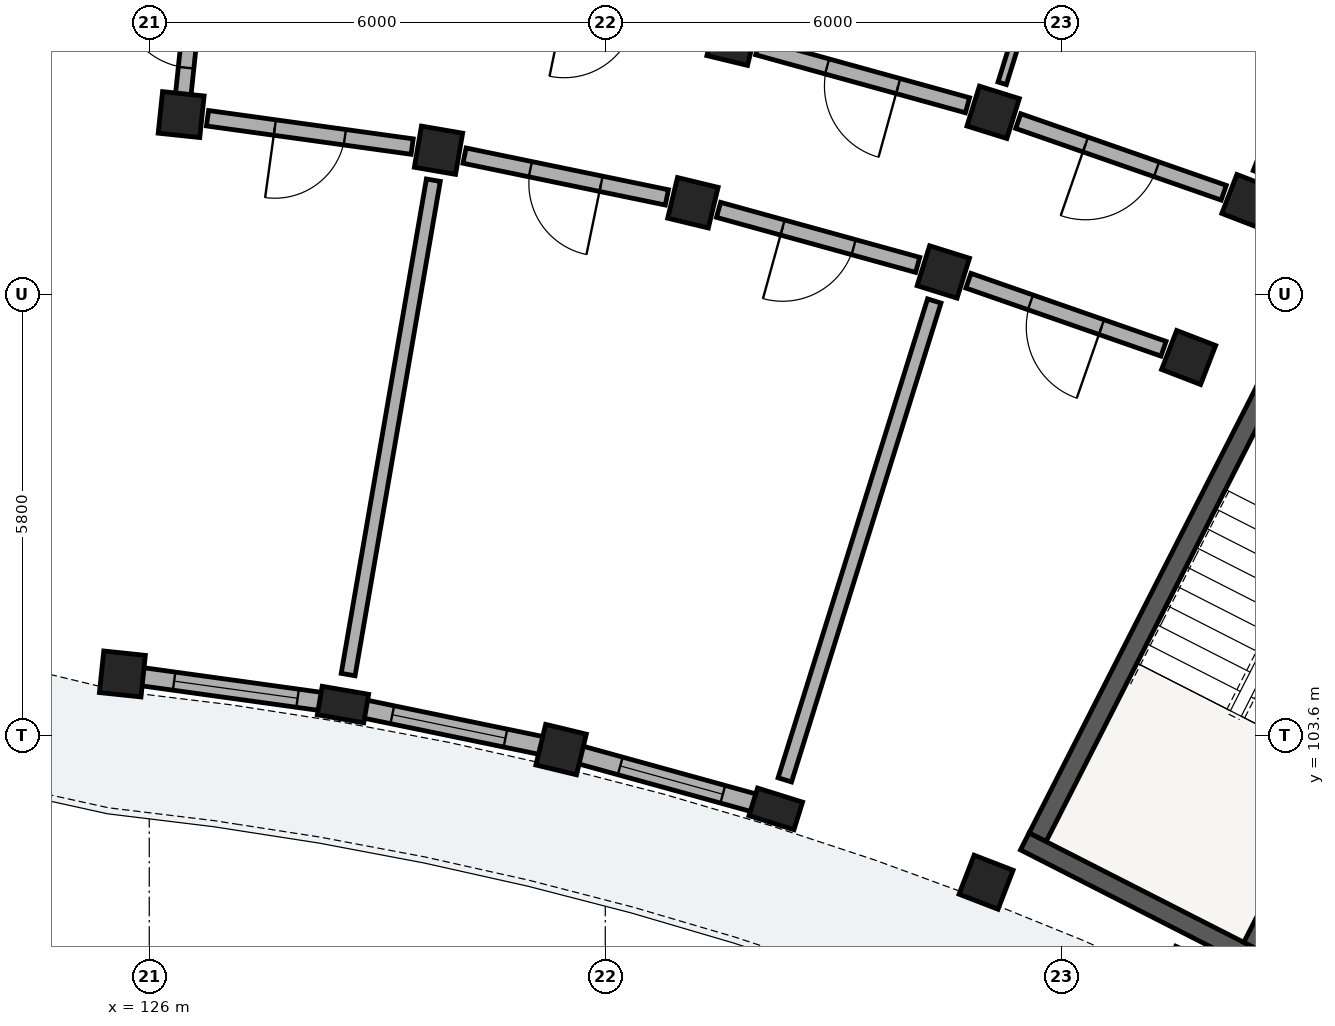
"""IFC4 building model, lengths in metres.
Left out: names, types, materials, properties, quantities, classifications, styles, units other than length and angle.
Written with IfcOpenShell. Run it as: python <this file> out.ifc"""

import sys

from ifc_helpers import new_model, si_unit, direction, frame, frame_2d, origin, origin_2d, place, context, subcontext, project, spatial, rectangle, extrude, element, fill, save


model = new_model("IFC4")
c1 = context("Model", 3, precision=1e-05, world=origin(), true_north=direction((0.0, 1.0)))
c2 = subcontext(c1, "Body", "Model", "MODEL_VIEW")
j1 = project(units=[si_unit("LENGTHUNIT", "METRE"), si_unit("PLANEANGLEUNIT", "RADIAN")], contexts=[c1])
p1 = place(None, origin())
s1 = spatial("IfcSite", under=j1, at=p1, CompositionType="ELEMENT")
p2 = place(p1, origin())
s2 = spatial("IfcBuilding", under=s1, at=p2, CompositionType="ELEMENT")
p3 = place(p2, frame((0.0, 0.0, 18.92)))
s3 = spatial("IfcBuildingStorey", under=s2, at=p3, CompositionType="ELEMENT", Elevation=18.92)
p4 = place(p3, frame((140.684, 108.139, 0.0), z_axis=(0.0, 0.0, 1.0), x_axis=(-0.453992276384, -0.891005618941, 0.0)))
e1 = element("IfcWall", 1, at=p4, inside=s3, PredefinedType="SHEAR", context=c2, shape_type="SweptSolid", body=[
    extrude(rectangle(XDim=6.6, YDim=0.25, at=frame_2d((3.3, 0.0))), origin(), (0.0, 0.0, 1.0), 3.11),
])
p5 = place(p3, frame((137.52, 102.203, 0.0), z_axis=(0.0, 0.0, 1.0), x_axis=(0.891003540237, -0.453996356025, 0.0)))
e2 = element("IfcWall", 2, at=p5, inside=s3, PredefinedType="SHEAR", context=c2, shape_type="SweptSolid", body=[
    extrude(rectangle(XDim=3.42, YDim=0.25, at=frame_2d((1.71, 0.0))), origin(), (0.0, 0.0, 1.0), 3.11),
])
p6 = place(p3, frame((143.509, 106.699, 0.0), z_axis=(0.0, 0.0, 1.0), x_axis=(-0.453992276384, -0.891005618941, 0.0)))
e3 = element("IfcWall", 3, at=p6, inside=s3, PredefinedType="SHEAR", context=c2, shape_type="SweptSolid", body=[
    extrude(rectangle(XDim=6.6, YDim=0.25, at=frame_2d((3.3, 0.0))), origin(), (0.0, 0.0, 1.0), 3.11),
])
p7 = place(p6, frame((0.22, 0.0, 0.0)))
e4 = element("IfcOpeningElement", 4, at=p7, cuts=e3, PredefinedType="OPENING", context=c2, shape_type="SweptSolid", body=[
    extrude(rectangle(XDim=1.05, YDim=2.15, at=frame_2d((0.525, 1.075))), frame((0.0, 0.135, 0.0), z_axis=(0.0, -1.0, 0.0), x_axis=(1.0, 0.0, 0.0)), (0.0, 0.0, 1.0), 0.27),
])
for number, where, z_axis, x_axis in (
    (5, (137.01, 101.667, 0.0), (0.0, 0.0, 1.0), (0.36, 0.933, 0.0)),
    (6, (139.675, 108.57, 0.0), (0.0, 0.0, 1.0), (0.36, 0.933, 0.0)),
    (7, (140.468, 110.622, 0.0), (0.0, 0.0, 1.0), (0.36, 0.933, 0.0)),
):
    element("IfcColumn", number, at=place(p3, frame(where, z_axis=z_axis, x_axis=x_axis)), inside=s3, PredefinedType="COLUMN", context=c2, shape_type="SweptSolid", body=[
        extrude(rectangle(XDim=0.55, YDim=0.55, at=origin_2d()), origin(), (0.0, 0.0, 1.0), 3.11),
    ])
p8 = place(p3, frame((134.243, 102.631, 0.0), z_axis=(0.0, 0.0, 1.0), x_axis=(0.297930225503, 0.954587649581, 0.0)))
e8 = element("IfcColumn", 8, at=p8, inside=s3, PredefinedType="PILASTER", context=c2, shape_type="SweptSolid", body=[
    extrude(rectangle(XDim=0.38, YDim=0.62, at=origin_2d()), origin(), (0.0, 0.0, 1.0), 3.11),
])
for number, where, z_axis, x_axis in (
    (9, (136.448, 109.695, 0.0), (0.0, 0.0, 1.0), (0.298, 0.955, 0.0)),
    (10, (137.103, 111.795, 0.0), (0.0, 0.0, 1.0), (0.298, 0.955, 0.0)),
    (11, (131.418, 103.412, 0.0), (0.0, 0.0, 1.0), (0.234, 0.972, 0.0)),
    (12, (133.153, 110.606, 0.0), (0.0, 0.0, 1.0), (0.234, 0.972, 0.0)),
    (13, (133.669, 112.744, 0.0), (0.0, 0.0, 1.0), (0.234, 0.972, 0.0)),
):
    element("IfcColumn", number, at=place(p3, frame(where, z_axis=z_axis, x_axis=x_axis)), inside=s3, PredefinedType="COLUMN", context=c2, shape_type="SweptSolid", body=[
        extrude(rectangle(XDim=0.55, YDim=0.55, at=origin_2d()), origin(), (0.0, 0.0, 1.0), 3.11),
    ])
p9 = place(p3, frame((128.549, 104.004, 0.0), z_axis=(0.0, 0.0, 1.0), x_axis=(0.169827230012, 0.985473851478, 0.0)))
e14 = element("IfcColumn", 14, at=p9, inside=s3, PredefinedType="PILASTER", context=c2, shape_type="SweptSolid", body=[
    extrude(rectangle(XDim=0.38, YDim=0.62, at=origin_2d()), origin(), (0.0, 0.0, 1.0), 3.11),
])
for number, where, z_axis, x_axis in (
    (15, (129.806, 111.297, 0.0), (0.0, 0.0, 1.0), (0.17, 0.985, 0.0)),
    (16, (125.646, 104.406, 0.0), (0.0, 0.0, 1.0), (0.105, 0.995, 0.0)),
    (17, (126.42, 111.766, 0.0), (0.0, 0.0, 1.0), (0.105, 0.995, 0.0)),
):
    element("IfcColumn", number, at=place(p3, frame(where, z_axis=z_axis, x_axis=x_axis)), inside=s3, PredefinedType="COLUMN", context=c2, shape_type="SweptSolid", body=[
        extrude(rectangle(XDim=0.55, YDim=0.55, at=origin_2d()), origin(), (0.0, 0.0, 1.0), 3.11),
    ])
p10 = place(p3, frame((134.089, 102.674, 0.0), z_axis=(0.0, 0.0, 1.0), x_axis=(-0.963901971286, 0.266257375017, 0.0)))
e18 = element("IfcWall", 18, at=p10, inside=s3, PredefinedType="SOLIDWALL", context=c2, shape_type="SweptSolid", body=[
    extrude(rectangle(XDim=2.525, YDim=0.24, at=frame_2d((1.263, 0.0))), origin(), (0.0, 0.0, 1.0), 2.355),
])
p11 = place(p10, frame((0.562, 0.0, 0.35)))
e19 = element("IfcOpeningElement", 19, at=p11, cuts=e18, PredefinedType="OPENING", context=c2, shape_type="SweptSolid", body=[
    extrude(rectangle(XDim=1.4, YDim=1.635, at=frame_2d((0.7, 0.817))), frame((0.0, 0.13, 0.0), z_axis=(0.0, -1.0, 0.0), x_axis=(1.0, 0.0, 0.0)), (0.0, 0.0, 1.0), 0.26),
])
p12 = place(p3, frame((131.179, 103.461, 0.0), z_axis=(0.0, 0.0, 1.0), x_axis=(-0.979353576928, 0.202154820272, 0.0)))
e20 = element("IfcWall", 20, at=p12, inside=s3, PredefinedType="SOLIDWALL", context=c2, shape_type="SweptSolid", body=[
    extrude(rectangle(XDim=2.525, YDim=0.24, at=frame_2d((1.263, 0.0))), origin(), (0.0, 0.0, 1.0), 2.355),
])
p13 = place(p12, frame((0.503, 0.0, 0.55)))
e21 = element("IfcOpeningElement", 21, at=p13, cuts=e20, PredefinedType="OPENING", context=c2, shape_type="SweptSolid", body=[
    extrude(rectangle(XDim=1.52, YDim=1.485, at=frame_2d((0.76, 0.743))), frame((0.0, 0.13, 0.0), z_axis=(0.0, -1.0, 0.0), x_axis=(1.0, 0.0, 0.0)), (0.0, 0.0, 1.0), 0.26),
])
p14 = place(p3, frame((128.39, 104.026, 0.0), z_axis=(0.0, 0.0, 1.0), x_axis=(-0.990545622952, 0.13718370476, 0.0)))
e22 = element("IfcWall", 22, at=p14, inside=s3, PredefinedType="SOLIDWALL", context=c2, shape_type="SweptSolid", body=[
    extrude(rectangle(XDim=2.525, YDim=0.24, at=frame_2d((1.263, 0.0))), origin(), (0.0, 0.0, 1.0), 2.355),
])
p15 = place(p14, frame((0.443, 0.0, 0.55)))
e23 = element("IfcOpeningElement", 23, at=p15, cuts=e22, PredefinedType="OPENING", context=c2, shape_type="SweptSolid", body=[
    extrude(rectangle(XDim=1.64, YDim=1.56, at=frame_2d((0.82, 0.78))), frame((0.0, 0.13, 0.0), z_axis=(0.0, -1.0, 0.0), x_axis=(1.0, 0.0, 0.0)), (0.0, 0.0, 1.0), 0.26),
])
p16 = place(p3, frame((140.612, 110.996, 0.0), z_axis=(0.0, 0.0, 1.0), x_axis=(0.360186633854, 0.932880264982, 0.0)))
e24 = element("IfcWall", 24, at=p16, inside=s3, PredefinedType="PARTITIONING", context=c2, shape_type="SweptSolid", body=[
    extrude(rectangle(XDim=4.7, YDim=0.185, at=frame_2d((2.35, 0.0))), origin(), (0.0, 0.0, 1.0), 2.37),
])
p17 = place(p3, frame((140.137, 110.738, 0.0), z_axis=(0.0, 0.0, 1.0), x_axis=(-0.944253820929, 0.329218349522, 0.0)))
e25 = element("IfcWall", 25, at=p17, inside=s3, PredefinedType="PARTITIONING", context=c2, shape_type="SweptSolid", body=[
    extrude(rectangle(XDim=2.863, YDim=0.205, at=frame_2d((1.432, 0.0))), origin(), (0.0, 0.0, 1.0), 2.37),
])
p18 = place(p17, frame((0.937, 0.0, 0.0)))
e26 = element("IfcOpeningElement", 26, at=p18, cuts=e25, PredefinedType="OPENING", context=c2, shape_type="SweptSolid", body=[
    extrude(rectangle(XDim=0.99, YDim=2.16, at=frame_2d((0.495, 1.08))), frame((0.0, 0.113, 0.0), z_axis=(0.0, -1.0, 0.0), x_axis=(1.0, 0.0, 0.0)), (0.0, 0.0, 1.0), 0.225),
])
p19 = place(p3, frame((139.345, 108.685, 0.0), z_axis=(0.0, 0.0, 1.0), x_axis=(-0.944265123647, 0.329185929627, 0.0)))
e27 = element("IfcWall", 27, at=p19, inside=s3, PredefinedType="PARTITIONING", context=c2, shape_type="SweptSolid", body=[
    extrude(rectangle(XDim=2.718, YDim=0.205, at=frame_2d((1.359, 0.0))), origin(), (0.0, 0.0, 1.0), 2.37),
])
p20 = place(p19, frame((0.864, 0.0, 0.0)))
e28 = element("IfcOpeningElement", 28, at=p20, cuts=e27, PredefinedType="OPENING", context=c2, shape_type="SweptSolid", body=[
    extrude(rectangle(XDim=0.99, YDim=2.16, at=frame_2d((0.495, 1.08))), frame((0.0, 0.113, 0.0), z_axis=(0.0, -1.0, 0.0), x_axis=(1.0, 0.0, 0.0)), (0.0, 0.0, 1.0), 0.225),
])
p21 = place(p3, frame((137.222, 112.177, 0.0), z_axis=(0.0, 0.0, 1.0), x_axis=(0.297905254614, 0.954595442726, 0.0)))
e29 = element("IfcWall", 29, at=p21, inside=s3, PredefinedType="PARTITIONING", context=c2, shape_type="SweptSolid", body=[
    extrude(rectangle(XDim=4.7, YDim=0.115, at=frame_2d((2.35, 0.0))), origin(), (0.0, 0.0, 1.0), 2.37),
])
p22 = place(p21, frame((1.905, 0.0, 0.0)))
e30 = element("IfcOpeningElement", 30, at=p22, cuts=e29, PredefinedType="OPENING", context=c2, shape_type="SweptSolid", body=[
    extrude(rectangle(XDim=0.89, YDim=2.1, at=frame_2d((0.445, 1.05))), frame((0.0, 0.067, 0.0), z_axis=(0.0, -1.0, 0.0), x_axis=(1.0, 0.0, 0.0)), (0.0, 0.0, 1.0), 0.135),
])
p23 = place(p3, frame((134.362, 103.013, 0.0), z_axis=(0.0, 0.0, 1.0), x_axis=(0.2979590431, 0.954578655028, 0.0)))
e31 = element("IfcWall", 31, at=p23, inside=s3, PredefinedType="PARTITIONING", context=c2, shape_type="SweptSolid", body=[
    extrude(rectangle(XDim=6.6, YDim=0.185, at=frame_2d((3.3, 0.0))), origin(), (0.0, 0.0, 1.0), 2.37),
])
p24 = place(p3, frame((136.766, 111.889, 0.0), z_axis=(0.0, 0.0, 1.0), x_axis=(-0.963890789093, 0.266297853356, 0.0)))
e32 = element("IfcWall", 32, at=p24, inside=s3, PredefinedType="PARTITIONING", context=c2, shape_type="SweptSolid", body=[
    extrude(rectangle(XDim=2.863, YDim=0.205, at=frame_2d((1.432, 0.0))), origin(), (0.0, 0.0, 1.0), 2.37),
])
p25 = place(p24, frame((0.947, 0.0, 0.0)))
e33 = element("IfcOpeningElement", 33, at=p25, cuts=e32, PredefinedType="OPENING", context=c2, shape_type="SweptSolid", body=[
    extrude(rectangle(XDim=0.97, YDim=2.15, at=frame_2d((0.485, 1.075))), frame((0.0, 0.113, 0.0), z_axis=(0.0, -1.0, 0.0), x_axis=(1.0, 0.0, 0.0)), (0.0, 0.0, 1.0), 0.225),
])
p26 = place(p3, frame((136.11, 109.789, 0.0), z_axis=(0.0, 0.0, 1.0), x_axis=(-0.96388375821, 0.266323301006, 0.0)))
e34 = element("IfcWall", 34, at=p26, inside=s3, PredefinedType="PARTITIONING", context=c2, shape_type="SweptSolid", body=[
    extrude(rectangle(XDim=2.718, YDim=0.205, at=frame_2d((1.359, 0.0))), origin(), (0.0, 0.0, 1.0), 2.37),
])
p27 = place(p26, frame((0.874, 0.0, 0.0)))
e35 = element("IfcOpeningElement", 35, at=p27, cuts=e34, PredefinedType="OPENING", context=c2, shape_type="SweptSolid", body=[
    extrude(rectangle(XDim=0.97, YDim=2.15, at=frame_2d((0.485, 1.075))), frame((0.0, 0.113, 0.0), z_axis=(0.0, -1.0, 0.0), x_axis=(1.0, 0.0, 0.0)), (0.0, 0.0, 1.0), 0.225),
])
p28 = place(p3, frame((132.81, 110.677, 0.0), z_axis=(0.0, 0.0, 1.0), x_axis=(-0.979349423541, 0.202174940608, 0.0)))
e36 = element("IfcWall", 36, at=p28, inside=s3, PredefinedType="PARTITIONING", context=c2, shape_type="SweptSolid", body=[
    extrude(rectangle(XDim=2.718, YDim=0.205, at=frame_2d((1.359, 0.0))), origin(), (0.0, 0.0, 1.0), 2.37),
])
p29 = place(p28, frame((0.884, 0.0, 0.0)))
e37 = element("IfcOpeningElement", 37, at=p29, cuts=e36, PredefinedType="OPENING", context=c2, shape_type="SweptSolid", body=[
    extrude(rectangle(XDim=0.95, YDim=2.13, at=frame_2d((0.475, 1.065))), frame((0.0, 0.113, 0.0), z_axis=(0.0, -1.0, 0.0), x_axis=(1.0, 0.0, 0.0)), (0.0, 0.0, 1.0), 0.225),
])
p30 = place(p3, frame((128.617, 104.398, 0.0), z_axis=(0.0, 0.0, 1.0), x_axis=(0.169825160084, 0.985474208187, 0.0)))
e38 = element("IfcWall", 38, at=p30, inside=s3, PredefinedType="PARTITIONING", context=c2, shape_type="SweptSolid", body=[
    extrude(rectangle(XDim=6.6, YDim=0.185, at=frame_2d((3.3, 0.0))), origin(), (0.0, 0.0, 1.0), 2.37),
])
p31 = place(p3, frame((129.459, 111.345, 0.0), z_axis=(0.0, 0.0, 1.0), x_axis=(-0.990535404475, 0.137257467855, 0.0)))
e39 = element("IfcWall", 39, at=p31, inside=s3, PredefinedType="PARTITIONING", context=c2, shape_type="SweptSolid", body=[
    extrude(rectangle(XDim=2.718, YDim=0.205, at=frame_2d((1.359, 0.0))), origin(), (0.0, 0.0, 1.0), 2.37),
])
p32 = place(p31, frame((0.894, 0.0, 0.0)))
e40 = element("IfcOpeningElement", 40, at=p32, cuts=e39, PredefinedType="OPENING", context=c2, shape_type="SweptSolid", body=[
    extrude(rectangle(XDim=0.93, YDim=2.12, at=frame_2d((0.465, 1.06))), frame((0.0, 0.113, 0.0), z_axis=(0.0, -1.0, 0.0), x_axis=(1.0, 0.0, 0.0)), (0.0, 0.0, 1.0), 0.225),
])
p33 = place(p3, frame((126.425, 111.816, 0.0), z_axis=(0.0, 0.0, 1.0), x_axis=(0.104509292252, 0.994523910136, 0.0)))
e41 = element("IfcWall", 41, at=p33, inside=s3, PredefinedType="PARTITIONING", context=c2, shape_type="SweptSolid", body=[
    extrude(rectangle(XDim=2.1, YDim=0.205, at=frame_2d((1.05, 0.0))), origin(), (0.0, 0.0, 1.0), 2.37),
])
p34 = place(p33, frame((0.57, 0.0, 0.0)))
e42 = element("IfcOpeningElement", 42, at=p34, cuts=e41, PredefinedType="OPENING", context=c2, shape_type="SweptSolid", body=[
    extrude(rectangle(XDim=0.95, YDim=2.13, at=frame_2d((0.475, 1.065))), frame((0.0, 0.113, 0.0), z_axis=(0.0, -1.0, 0.0), x_axis=(1.0, 0.0, 0.0)), (0.0, 0.0, 1.0), 0.225),
])
p35 = place(p11, origin())
e43 = element("IfcWindow", 43, at=p35, inside=s3, PartitioningType="SINGLE_PANEL", PredefinedType="WINDOW", context=c2, shape_type="SweptSolid", body=[
    extrude(rectangle(XDim=1.4, YDim=1.635, at=frame_2d((0.7, 0.817))), frame((0.0, 0.03, 0.0), z_axis=(0.0, -1.0, 0.0), x_axis=(1.0, 0.0, 0.0)), (0.0, 0.0, 1.0), 0.06),
])
fill(e19, e43)
p36 = place(p13, origin())
e44 = element("IfcWindow", 44, at=p36, inside=s3, PartitioningType="SINGLE_PANEL", PredefinedType="WINDOW", context=c2, shape_type="SweptSolid", body=[
    extrude(rectangle(XDim=1.52, YDim=1.485, at=frame_2d((0.76, 0.743))), frame((0.0, 0.03, 0.0), z_axis=(0.0, -1.0, 0.0), x_axis=(1.0, 0.0, 0.0)), (0.0, 0.0, 1.0), 0.06),
])
fill(e21, e44)
p37 = place(p15, origin())
e45 = element("IfcWindow", 45, at=p37, inside=s3, PartitioningType="SINGLE_PANEL", PredefinedType="WINDOW", context=c2, shape_type="SweptSolid", body=[
    extrude(rectangle(XDim=1.64, YDim=1.56, at=frame_2d((0.82, 0.78))), frame((0.0, 0.03, 0.0), z_axis=(0.0, -1.0, 0.0), x_axis=(1.0, 0.0, 0.0)), (0.0, 0.0, 1.0), 0.06),
])
fill(e23, e45)
p38 = place(p18, origin())
e46 = element("IfcDoor", 46, at=p38, inside=s3, OperationType="SINGLE_SWING_RIGHT", PredefinedType="DOOR", context=c2, shape_type="SweptSolid", body=[
    extrude(rectangle(XDim=0.99, YDim=2.16, at=frame_2d((0.495, 1.08))), frame((0.0, 0.025, 0.0), z_axis=(0.0, -1.0, 0.0), x_axis=(1.0, 0.0, 0.0)), (0.0, 0.0, 1.0), 0.05),
])
fill(e26, e46)
p39 = place(p20, origin())
e47 = element("IfcDoor", 47, at=p39, inside=s3, OperationType="SINGLE_SWING_LEFT", PredefinedType="DOOR", context=c2, shape_type="SweptSolid", body=[
    extrude(rectangle(XDim=0.99, YDim=2.16, at=frame_2d((0.495, 1.08))), frame((0.0, 0.025, 0.0), z_axis=(0.0, -1.0, 0.0), x_axis=(1.0, 0.0, 0.0)), (0.0, 0.0, 1.0), 0.05),
])
fill(e28, e47)
p40 = place(p25, origin())
e48 = element("IfcDoor", 48, at=p40, inside=s3, OperationType="SINGLE_SWING_LEFT", PredefinedType="DOOR", context=c2, shape_type="SweptSolid", body=[
    extrude(rectangle(XDim=0.97, YDim=2.15, at=frame_2d((0.485, 1.075))), frame((0.0, 0.025, 0.0), z_axis=(0.0, -1.0, 0.0), x_axis=(1.0, 0.0, 0.0)), (0.0, 0.0, 1.0), 0.05),
])
fill(e33, e48)
p41 = place(p27, origin())
e49 = element("IfcDoor", 49, at=p41, inside=s3, OperationType="SINGLE_SWING_RIGHT", PredefinedType="DOOR", context=c2, shape_type="SweptSolid", body=[
    extrude(rectangle(XDim=0.97, YDim=2.15, at=frame_2d((0.485, 1.075))), frame((0.0, 0.025, 0.0), z_axis=(0.0, -1.0, 0.0), x_axis=(1.0, 0.0, 0.0)), (0.0, 0.0, 1.0), 0.05),
])
fill(e35, e49)
p42 = place(p29, origin())
e50 = element("IfcDoor", 50, at=p42, inside=s3, OperationType="SINGLE_SWING_LEFT", PredefinedType="DOOR", context=c2, shape_type="SweptSolid", body=[
    extrude(rectangle(XDim=0.95, YDim=2.13, at=frame_2d((0.475, 1.065))), frame((0.0, 0.025, 0.0), z_axis=(0.0, -1.0, 0.0), x_axis=(1.0, 0.0, 0.0)), (0.0, 0.0, 1.0), 0.05),
])
fill(e37, e50)
p43 = place(p32, origin())
e51 = element("IfcDoor", 51, at=p43, inside=s3, OperationType="SINGLE_SWING_RIGHT", PredefinedType="DOOR", context=c2, shape_type="SweptSolid", body=[
    extrude(rectangle(XDim=0.93, YDim=2.12, at=frame_2d((0.465, 1.06))), frame((0.0, 0.025, 0.0), z_axis=(0.0, -1.0, 0.0), x_axis=(1.0, 0.0, 0.0)), (0.0, 0.0, 1.0), 0.05),
])
fill(e40, e51)
p44 = place(p34, origin())
e52 = element("IfcDoor", 52, at=p44, inside=s3, OperationType="SINGLE_SWING_RIGHT", PredefinedType="DOOR", context=c2, shape_type="SweptSolid", body=[
    extrude(rectangle(XDim=0.95, YDim=2.13, at=frame_2d((0.475, 1.065))), frame((0.0, 0.025, 0.0), z_axis=(0.0, -1.0, 0.0), x_axis=(1.0, 0.0, 0.0)), (0.0, 0.0, 1.0), 0.05),
])
fill(e42, e52)
save(model, sys.argv[1])
